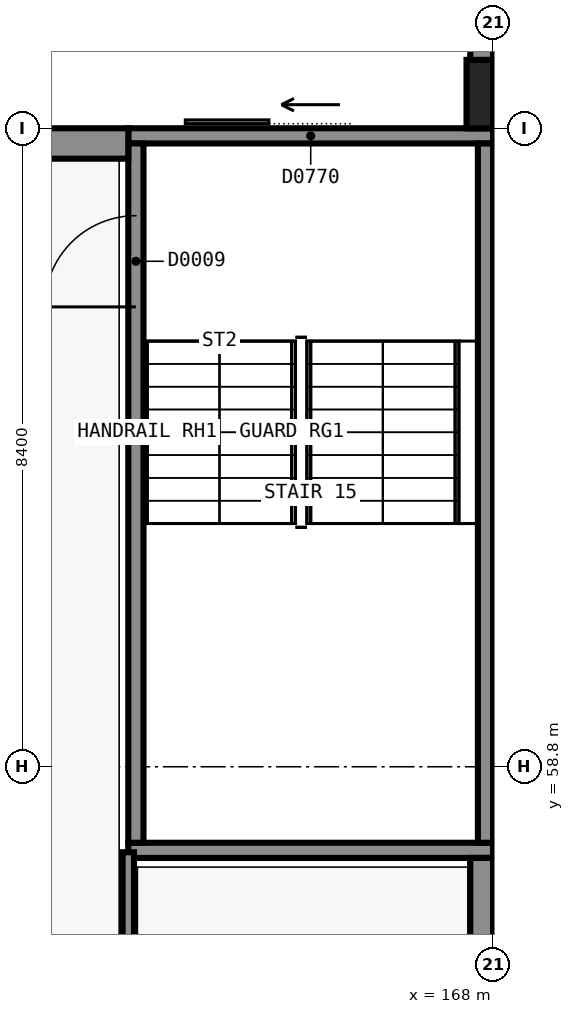
"""IFC4 building model, lengths in metres.
Left out: names, types, materials, properties, quantities, classifications, styles, units other than length and angle.
Written with IfcOpenShell. Run it as: python <this file> out.ifc"""

import sys

from ifc_helpers import new_model, si_unit, direction, frame, frame_2d, origin, origin_2d, place, context, subcontext, project, spatial, rectangle, extrude, element, fill, save


model = new_model("IFC4")
c1 = context("Model", 3, precision=1e-05, world=origin(), true_north=direction((0.0, 1.0)))
c2 = subcontext(c1, "Body", "Model", "MODEL_VIEW")
j1 = project(units=[si_unit("LENGTHUNIT", "METRE"), si_unit("PLANEANGLEUNIT", "RADIAN")], contexts=[c1])
p1 = place(None, origin())
s1 = spatial("IfcSite", under=j1, at=p1, CompositionType="ELEMENT")
p2 = place(p1, origin())
s2 = spatial("IfcBuilding", under=s1, at=p2, CompositionType="ELEMENT")
p3 = place(p2, origin())
s3 = spatial("IfcBuildingStorey", under=s2, at=p3, CompositionType="ELEMENT", Elevation=0.0)
p4 = place(p3, frame((168.0, 57.7, -0.3), z_axis=(0.0, 0.0, 1.0), x_axis=(-1.0, 0.0, 0.0)))
e1 = element("IfcWall", 1, at=p4, inside=s3, PredefinedType="SHEAR", context=c2, shape_type="SweptSolid", body=[
    extrude(rectangle(XDim=4.8, YDim=0.2, at=frame_2d((2.4, 0.0))), origin(), (0.0, 0.0, 1.0), 5.7),
])
p5 = place(p3, frame((163.2, 67.1, -0.3), z_axis=(0.0, 0.0, 1.0), x_axis=(1.0, 0.0, 0.0)))
e2 = element("IfcWall", 2, at=p5, inside=s3, PredefinedType="SHEAR", context=c2, shape_type="SweptSolid", body=[
    extrude(rectangle(XDim=4.8, YDim=0.2, at=frame_2d((2.4, 0.0))), origin(), (0.0, 0.0, 1.0), 5.7),
])
p6 = place(p5, frame((1.85, 0.0, 0.0)))
e3 = element("IfcOpeningElement", 3, at=p6, cuts=e2, PredefinedType="OPENING", context=c2, shape_type="SweptSolid", body=[
    extrude(rectangle(XDim=1.1, YDim=2.2, at=frame_2d((0.55, 1.1))), frame((0.0, 0.11, 0.0), z_axis=(0.0, -1.0, 0.0), x_axis=(1.0, 0.0, 0.0)), (0.0, 0.0, 1.0), 0.22),
])
p7 = place(p3, frame((163.3, 57.8, -0.3), z_axis=(0.0, 0.0, 1.0), x_axis=(0.0, 1.0, 0.0)))
e4 = element("IfcWall", 4, at=p7, inside=s3, PredefinedType="SHEAR", context=c2, shape_type="SweptSolid", body=[
    extrude(rectangle(XDim=9.2, YDim=0.2, at=frame_2d((4.6, 0.0))), origin(), (0.0, 0.0, 1.0), 5.7),
])
p8 = place(p7, frame((7.05, 0.0, 0.3)))
e5 = element("IfcOpeningElement", 5, at=p8, cuts=e4, PredefinedType="OPENING", context=c2, shape_type="SweptSolid", body=[
    extrude(rectangle(XDim=1.2, YDim=2.1, at=frame_2d((0.6, 1.05))), frame((0.0, 0.11, 0.0), z_axis=(0.0, -1.0, 0.0), x_axis=(1.0, 0.0, 0.0)), (0.0, 0.0, 1.0), 0.22),
])
p9 = place(p3, frame((167.9, 67.0, -0.3), z_axis=(0.0, 0.0, 1.0), x_axis=(0.0, -1.0, 0.0)))
e6 = element("IfcWall", 6, at=p9, inside=s3, PredefinedType="SHEAR", context=c2, shape_type="SweptSolid", body=[
    extrude(rectangle(XDim=9.2, YDim=0.2, at=frame_2d((4.6, 0.0))), origin(), (0.0, 0.0, 1.0), 5.7),
])
p10 = place(p3, frame((167.85, 57.6, -0.3), z_axis=(0.0, 0.0, 1.0), x_axis=(0.0, -1.0, 0.0)))
e7 = element("IfcWall", 7, at=p10, inside=s3, PredefinedType="SOLIDWALL", context=c2, shape_type="SweptSolid", body=[
    extrude(rectangle(XDim=14.4, YDim=0.3, at=frame_2d((7.2, 0.0))), origin(), (0.0, 0.0, 1.0), 5.7),
])
p11 = place(p3, frame((160.4, 67.0, -0.3), z_axis=(0.0, 0.0, 1.0), x_axis=(1.0, 0.0, 0.0)))
e8 = element("IfcWall", 8, at=p11, inside=s3, PredefinedType="SHEAR", context=c2, shape_type="SweptSolid", body=[
    extrude(rectangle(XDim=2.8, YDim=0.4, at=frame_2d((1.4, 0.0))), origin(), (0.0, 0.0, 1.0), 5.7),
])
p12 = place(p3, frame((167.85, 57.6, -1.2), z_axis=(0.0, 0.0, 1.0), x_axis=(0.0, -1.0, 0.0)))
e9 = element("IfcWall", 9, at=p12, inside=s3, PredefinedType="SOLIDWALL", context=c2, shape_type="SweptSolid", body=[
    extrude(rectangle(XDim=5.3, YDim=0.3, at=frame_2d((2.65, 0.0))), origin(), (0.0, 0.0, 1.0), 0.9),
])
p13 = place(p3, frame((167.85, 69.5, -1.2), z_axis=(0.0, 0.0, 1.0), x_axis=(0.0, -1.0, 0.0)))
e10 = element("IfcWall", 10, at=p13, inside=s3, PredefinedType="SOLIDWALL", context=c2, shape_type="SweptSolid", body=[
    extrude(rectangle(XDim=2.3, YDim=0.3, at=frame_2d((1.15, 0.0))), origin(), (0.0, 0.0, 1.0), 0.9),
])
p14 = place(p3, frame((167.825, 67.65, -0.3), z_axis=(0.0, 0.0, 1.0), x_axis=(1.0, 0.0, 0.0)))
e11 = element("IfcColumn", 11, at=p14, inside=s3, PredefinedType="PILASTER", context=c2, shape_type="SweptSolid", body=[
    extrude(rectangle(XDim=0.35, YDim=0.9, at=origin_2d()), origin(), (0.0, 0.0, 1.0), 5.7),
])
p15 = place(p3, frame((163.2, 43.125, 0.0), z_axis=(0.0, 0.0, 1.0), x_axis=(0.0, 1.0, 0.0)))
e12 = element("IfcWall", 12, at=p15, inside=s3, PredefinedType="PARTITIONING", context=c2, shape_type="SweptSolid", body=[
    extrude(rectangle(XDim=14.55, YDim=0.15, at=frame_2d((7.275, 0.0))), origin(), (0.0, 0.0, 1.0), 4.4),
])
p16 = place(p15, frame((6.775, 0.0, 0.0)))
e13 = element("IfcOpeningElement", 13, at=p16, cuts=e12, PredefinedType="OPENING", context=c2, shape_type="SweptSolid", body=[
    extrude(rectangle(XDim=1.0, YDim=2.1, at=frame_2d((0.5, 1.05))), frame((0.0, 0.085, 0.0), z_axis=(0.0, -1.0, 0.0), x_axis=(1.0, 0.0, 0.0)), (0.0, 0.0, 1.0), 0.17),
])
p17 = place(p6, origin())
e14 = element("IfcDoor", 14, at=p17, inside=s3, OperationType="SLIDING_TO_LEFT", PredefinedType="DOOR", context=c2, shape_type="SweptSolid", body=[
    extrude(rectangle(XDim=1.1, YDim=2.2, at=frame_2d((0.55, 1.1))), frame((0.0, 0.025, 0.0), z_axis=(0.0, -1.0, 0.0), x_axis=(1.0, 0.0, 0.0)), (0.0, 0.0, 1.0), 0.05),
])
fill(e3, e14)
p18 = place(p8, origin())
e15 = element("IfcDoor", 15, at=p18, inside=s3, OperationType="SINGLE_SWING_RIGHT", PredefinedType="DOOR", context=c2, shape_type="SweptSolid", body=[
    extrude(rectangle(XDim=1.2, YDim=2.1, at=frame_2d((0.6, 1.05))), frame((0.0, 0.025, 0.0), z_axis=(0.0, -1.0, 0.0), x_axis=(1.0, 0.0, 0.0)), (0.0, 0.0, 1.0), 0.05),
])
fill(e5, e15)
save(model, sys.argv[1])
